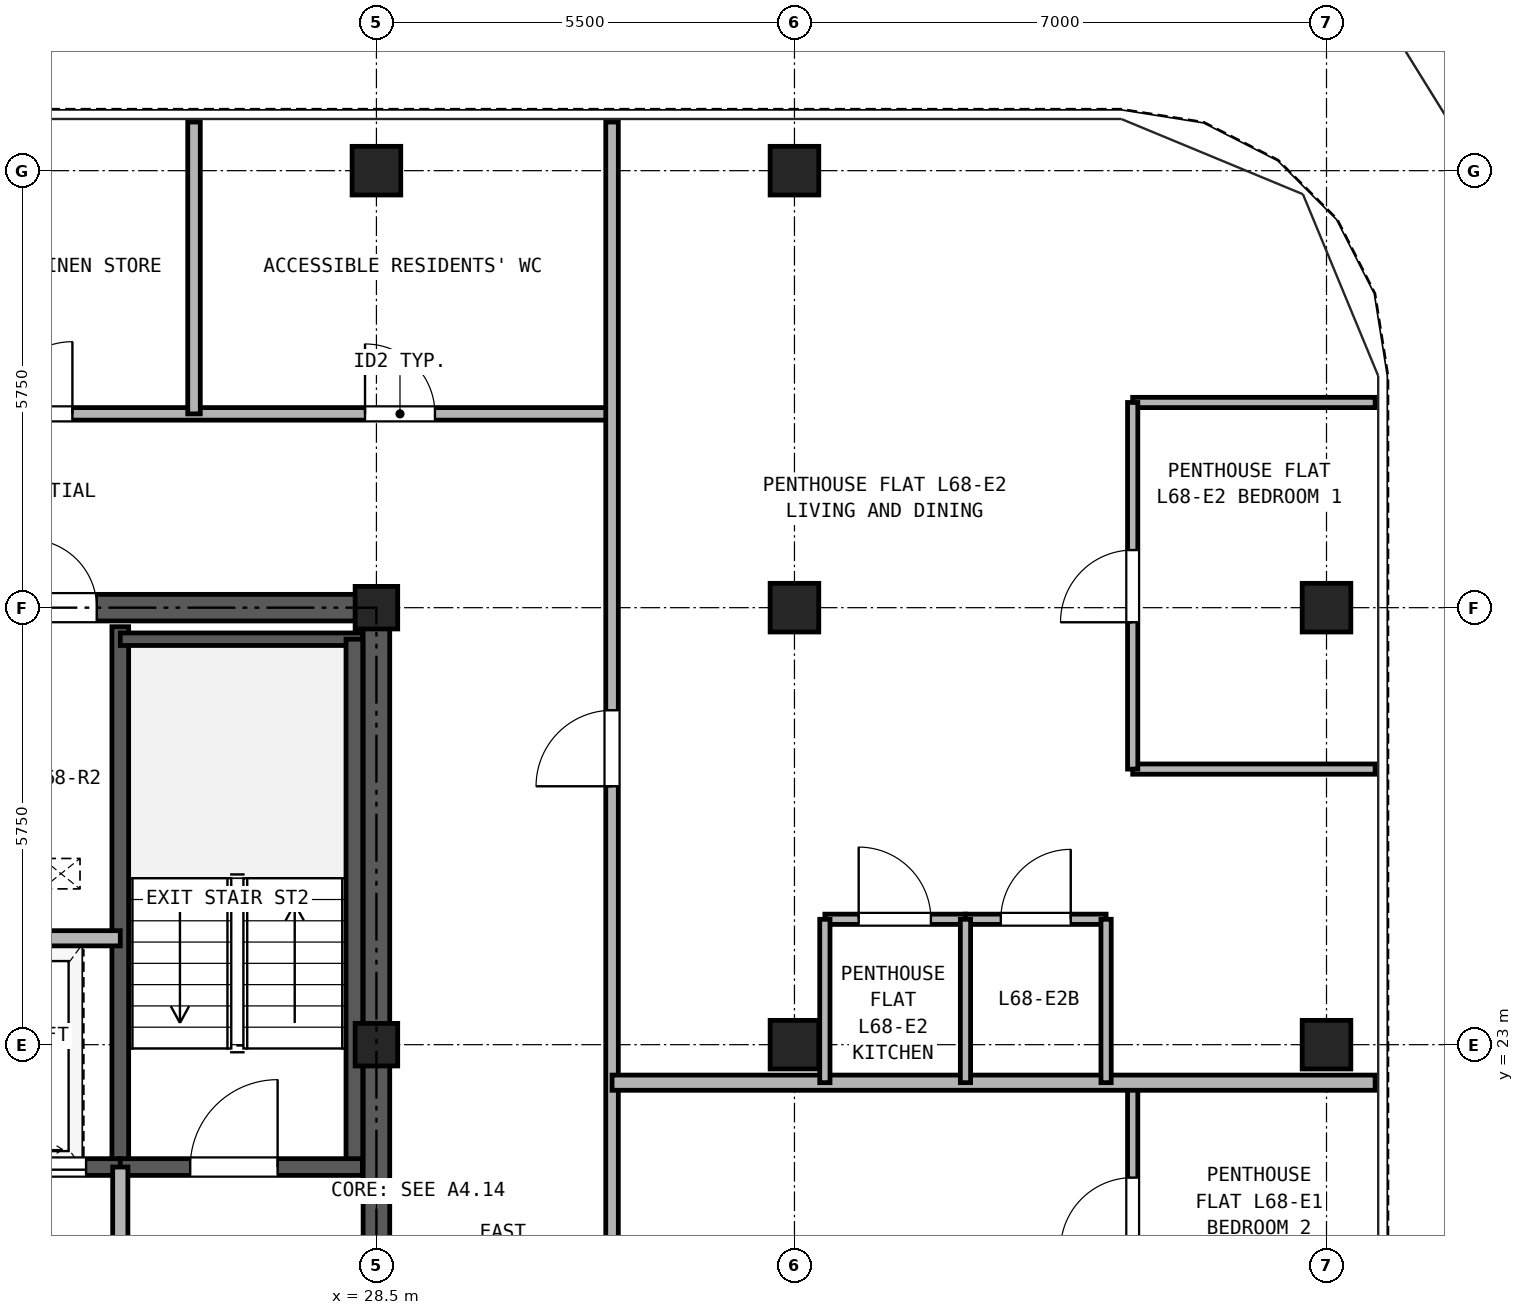
"""IFC4 building model, lengths in metres.
Left out: names, types, materials, properties, quantities, classifications, styles, units other than length and angle.
Written with IfcOpenShell. Run it as: python <this file> out.ifc"""

import sys

from ifc_helpers import new_model, si_unit, direction, frame, frame_2d, origin, origin_2d, place, context, subcontext, project, spatial, rectangle, hollow_rectangle, extrude, source, transform, mapped, element, fill, save


model = new_model("IFC4")
c1 = context("Model", 3, precision=1e-05, world=origin(), true_north=direction((0.0, 1.0)))
c2 = subcontext(c1, "Body", "Model", "MODEL_VIEW")
j1 = project(units=[si_unit("LENGTHUNIT", "METRE"), si_unit("PLANEANGLEUNIT", "RADIAN")], contexts=[c1])
p1 = place(None, origin())
s1 = spatial("IfcSite", under=j1, at=p1, CompositionType="ELEMENT")
p2 = place(p1, origin())
s2 = spatial("IfcBuilding", under=s1, at=p2, CompositionType="ELEMENT")
p3 = place(p2, frame((0.0, 0.0, 239.3)))
s3 = spatial("IfcBuildingStorey", under=s2, at=p3, CompositionType="ELEMENT", Elevation=239.3)
m1 = source(origin(), c2, "Body", "SweptSolid", [
    extrude(hollow_rectangle(XDim=0.64, YDim=0.64, WallThickness=0.035, at=origin_2d()), origin(), (0.0, 0.0, 1.0), 2.98),
])
for number, where, z_axis, x_axis in (
    (1, (28.5, 34.5, 0.0), (0.0, 0.0, 1.0), (1.0, 0.0, 0.0)),
    (2, (34.0, 34.5, 0.0), (0.0, 0.0, 1.0), (1.0, 0.0, 0.0)),
    (3, (41.0, 23.0, 0.0), (0.0, 0.0, 1.0), (1.0, 0.0, 0.0)),
    (4, (41.0, 28.75, 0.0), (0.0, 0.0, 1.0), (1.0, 0.0, 0.0)),
):
    element("IfcColumn", number, at=place(p3, frame(where, z_axis=z_axis, x_axis=x_axis)), inside=s3, PredefinedType="COLUMN", context=c2, shape_type="MappedRepresentation", body=[
        mapped(m1, transform((0.0, 0.0, 0.0), x_axis=(1.0, 0.0, 0.0), y_axis=(0.0, 1.0, 0.0), z_axis=(0.0, 0.0, 1.0), scale=1.0)),
    ])
m2 = source(origin(), c2, "Body", "SweptSolid", [
    extrude(hollow_rectangle(XDim=0.56, YDim=0.56, WallThickness=0.03, at=origin_2d()), origin(), (0.0, 0.0, 1.0), 2.98),
])
for number, where, z_axis, x_axis in (
    (5, (28.5, 23.0, 0.0), (0.0, 0.0, 1.0), (1.0, 0.0, 0.0)),
    (6, (28.5, 28.75, 0.0), (0.0, 0.0, 1.0), (1.0, 0.0, 0.0)),
):
    element("IfcColumn", number, at=place(p3, frame(where, z_axis=z_axis, x_axis=x_axis)), inside=s3, PredefinedType="COLUMN", context=c2, shape_type="MappedRepresentation", body=[
        mapped(m2, transform((0.0, 0.0, 0.0), x_axis=(1.0, 0.0, 0.0), y_axis=(0.0, 1.0, 0.0), z_axis=(0.0, 0.0, 1.0), scale=1.0)),
    ])
for number, where, z_axis, x_axis in (
    (7, (34.0, 23.0, 0.0), (0.0, 0.0, 1.0), (1.0, 0.0, 0.0)),
    (8, (34.0, 28.75, 0.0), (0.0, 0.0, 1.0), (1.0, 0.0, 0.0)),
):
    element("IfcColumn", number, at=place(p3, frame(where, z_axis=z_axis, x_axis=x_axis)), inside=s3, PredefinedType="COLUMN", context=c2, shape_type="MappedRepresentation", body=[
        mapped(m1, transform((0.0, 0.0, 0.0), x_axis=(1.0, 0.0, 0.0), y_axis=(0.0, 1.0, 0.0), z_axis=(0.0, 0.0, 1.0), scale=1.0)),
    ])
p4 = place(p3, frame((18.325, 28.75, 0.0), z_axis=(0.0, 0.0, 1.0), x_axis=(1.0, 0.0, 0.0)))
e9 = element("IfcWall", 9, at=p4, inside=s3, PredefinedType="SHEAR", context=c2, shape_type="SweptSolid", body=[
    extrude(rectangle(XDim=10.35, YDim=0.35, at=frame_2d((5.175, 0.0))), origin(), (0.0, 0.0, 1.0), 2.98),
])
p5 = place(p4, frame((4.055, 0.0, 0.0)))
e10 = element("IfcOpeningElement", 10, at=p5, cuts=e9, PredefinedType="OPENING", context=c2, shape_type="SweptSolid", body=[
    extrude(rectangle(XDim=0.9, YDim=2.05, at=frame_2d((0.45, 1.025))), frame((0.0, 0.185, 0.0), z_axis=(0.0, -1.0, 0.0), x_axis=(1.0, 0.0, 0.0)), (0.0, 0.0, 1.0), 0.37),
])
p6 = place(p4, frame((5.595, 0.0, 0.0)))
e11 = element("IfcOpeningElement", 11, at=p6, cuts=e9, PredefinedType="OPENING", context=c2, shape_type="SweptSolid", body=[
    extrude(rectangle(XDim=0.9, YDim=2.05, at=frame_2d((0.45, 1.025))), frame((0.0, 0.185, 0.0), z_axis=(0.0, -1.0, 0.0), x_axis=(1.0, 0.0, 0.0)), (0.0, 0.0, 1.0), 0.37),
])
p7 = place(p3, frame((28.5, 11.675, 0.0), z_axis=(0.0, 0.0, 1.0), x_axis=(0.0, 1.0, 0.0)))
e12 = element("IfcWall", 12, at=p7, inside=s3, PredefinedType="SHEAR", context=c2, shape_type="SweptSolid", body=[
    extrude(rectangle(XDim=16.9, YDim=0.35, at=frame_2d((8.45, 0.0))), origin(), (0.0, 0.0, 1.0), 2.98),
])
p8 = place(p7, frame((7.475, 0.0, 0.0)))
e13 = element("IfcOpeningElement", 13, at=p8, cuts=e12, PredefinedType="OPENING", context=c2, shape_type="SweptSolid", body=[
    extrude(rectangle(XDim=1.15, YDim=2.2, at=frame_2d((0.575, 1.1))), frame((0.0, 0.185, 0.0), z_axis=(0.0, -1.0, 0.0), x_axis=(1.0, 0.0, 0.0)), (0.0, 0.0, 1.0), 0.37),
])
p9 = place(p3, frame((25.13, 21.39, 0.0), z_axis=(0.0, 0.0, 1.0), x_axis=(0.0, 1.0, 0.0)))
e14 = element("IfcWall", 14, at=p9, inside=s3, PredefinedType="SOLIDWALL", context=c2, shape_type="SweptSolid", body=[
    extrude(rectangle(XDim=7.11, YDim=0.22, at=frame_2d((3.555, 0.0))), origin(), (0.0, 0.0, 1.0), 2.98),
])
p10 = place(p3, frame((25.13, 28.335, 0.0), z_axis=(0.0, 0.0, 1.0), x_axis=(1.0, 0.0, 0.0)))
e15 = element("IfcWall", 15, at=p10, inside=s3, PredefinedType="PARTITIONING", context=c2, shape_type="SweptSolid", body=[
    extrude(rectangle(XDim=3.185, YDim=0.165, at=frame_2d((1.593, 0.0))), origin(), (0.0, 0.0, 1.0), 2.98),
])
p11 = place(p3, frame((28.21, 21.39, 0.0), z_axis=(0.0, 0.0, 1.0), x_axis=(0.0, 1.0, 0.0)))
e16 = element("IfcWall", 16, at=p11, inside=s3, PredefinedType="SOLIDWALL", context=c2, shape_type="SweptSolid", body=[
    extrude(rectangle(XDim=6.945, YDim=0.22, at=frame_2d((3.473, 0.0))), origin(), (0.0, 0.0, 1.0), 2.98),
])
p12 = place(p3, frame((18.685, 21.39, 0.0), z_axis=(0.0, 0.0, 1.0), x_axis=(1.0, 0.0, 0.0)))
e17 = element("IfcWall", 17, at=p12, inside=s3, PredefinedType="SOLIDWALL", context=c2, shape_type="SweptSolid", body=[
    extrude(rectangle(XDim=6.445, YDim=0.22, at=frame_2d((3.222, 0.0))), origin(), (0.0, 0.0, 1.0), 2.98),
])
p13 = place(p12, frame((1.165, 0.0, 0.0)))
e18 = element("IfcOpeningElement", 18, at=p13, cuts=e17, PredefinedType="OPENING", context=c2, shape_type="SweptSolid", body=[
    extrude(rectangle(XDim=1.15, YDim=2.2, at=frame_2d((0.575, 1.1))), frame((0.0, 0.12, 0.0), z_axis=(0.0, -1.0, 0.0), x_axis=(1.0, 0.0, 0.0)), (0.0, 0.0, 1.0), 0.24),
])
p14 = place(p12, frame((4.895, 0.0, 0.0)))
e19 = element("IfcOpeningElement", 19, at=p14, cuts=e17, PredefinedType="OPENING", context=c2, shape_type="SweptSolid", body=[
    extrude(rectangle(XDim=1.1, YDim=2.25, at=frame_2d((0.55, 1.125))), frame((0.0, 0.12, 0.0), z_axis=(0.0, -1.0, 0.0), x_axis=(1.0, 0.0, 0.0)), (0.0, 0.0, 1.0), 0.24),
])
p15 = place(p3, frame((25.13, 21.39, 0.0), z_axis=(0.0, 0.0, 1.0), x_axis=(1.0, 0.0, 0.0)))
e20 = element("IfcWall", 20, at=p15, inside=s3, PredefinedType="SOLIDWALL", context=c2, shape_type="SweptSolid", body=[
    extrude(rectangle(XDim=3.185, YDim=0.22, at=frame_2d((1.593, 0.0))), origin(), (0.0, 0.0, 1.0), 2.98),
])
p16 = place(p15, frame((0.92, 0.0, 0.0)))
e21 = element("IfcOpeningElement", 21, at=p16, cuts=e20, PredefinedType="OPENING", context=c2, shape_type="SweptSolid", body=[
    extrude(rectangle(XDim=1.15, YDim=2.2, at=frame_2d((0.575, 1.1))), frame((0.0, 0.12, 0.0), z_axis=(0.0, -1.0, 0.0), x_axis=(1.0, 0.0, 0.0)), (0.0, 0.0, 1.0), 0.24),
])
p17 = place(p3, frame((22.11, 24.4, 0.0), z_axis=(0.0, 0.0, 1.0), x_axis=(1.0, 0.0, 0.0)))
e22 = element("IfcWall", 22, at=p17, inside=s3, PredefinedType="PARTITIONING", context=c2, shape_type="SweptSolid", body=[
    extrude(rectangle(XDim=3.02, YDim=0.2, at=frame_2d((1.51, 0.0))), origin(), (0.0, 0.0, 1.0), 2.98),
])
p18 = place(p3, frame((25.13, 18.0, 0.0), z_axis=(0.0, 0.0, 1.0), x_axis=(0.0, 1.0, 0.0)))
e23 = element("IfcWall", 23, at=p18, inside=s3, PredefinedType="PARTITIONING", context=c2, shape_type="SweptSolid", body=[
    extrude(rectangle(XDim=3.39, YDim=0.2, at=frame_2d((1.695, 0.0))), origin(), (0.0, 0.0, 1.0), 2.98),
])
p19 = place(p18, frame((1.1, 0.0, 0.0)))
e24 = element("IfcOpeningElement", 24, at=p19, cuts=e23, PredefinedType="OPENING", context=c2, shape_type="SweptSolid", body=[
    extrude(rectangle(XDim=1.15, YDim=2.2, at=frame_2d((0.575, 1.1))), frame((0.0, 0.11, 0.0), z_axis=(0.0, -1.0, 0.0), x_axis=(1.0, 0.0, 0.0)), (0.0, 0.0, 1.0), 0.22),
])
p20 = place(p3, frame((15.4, 31.3, 0.0), z_axis=(0.0, 0.0, 1.0), x_axis=(1.0, 0.0, 0.0)))
e25 = element("IfcWall", 25, at=p20, inside=s3, PredefinedType="PARTITIONING", context=c2, shape_type="SweptSolid", body=[
    extrude(rectangle(XDim=16.2, YDim=0.165, at=frame_2d((8.1, 0.0))), origin(), (0.0, 0.0, 1.0), 2.98),
])
p21 = place(p20, frame((2.8, 0.0, 0.0)))
e26 = element("IfcOpeningElement", 26, at=p21, cuts=e25, PredefinedType="OPENING", context=c2, shape_type="SweptSolid", body=[
    extrude(rectangle(XDim=0.95, YDim=2.15, at=frame_2d((0.475, 1.075))), frame((0.0, 0.093, 0.0), z_axis=(0.0, -1.0, 0.0), x_axis=(1.0, 0.0, 0.0)), (0.0, 0.0, 1.0), 0.185),
])
p22 = place(p20, frame((8.15, 0.0, 0.0)))
e27 = element("IfcOpeningElement", 27, at=p22, cuts=e25, PredefinedType="OPENING", context=c2, shape_type="SweptSolid", body=[
    extrude(rectangle(XDim=0.95, YDim=2.15, at=frame_2d((0.475, 1.075))), frame((0.0, 0.093, 0.0), z_axis=(0.0, -1.0, 0.0), x_axis=(1.0, 0.0, 0.0)), (0.0, 0.0, 1.0), 0.185),
])
p23 = place(p20, frame((12.95, 0.0, 0.0)))
e28 = element("IfcOpeningElement", 28, at=p23, cuts=e25, PredefinedType="OPENING", context=c2, shape_type="SweptSolid", body=[
    extrude(rectangle(XDim=0.92, YDim=2.1, at=frame_2d((0.46, 1.05))), frame((0.0, 0.093, 0.0), z_axis=(0.0, -1.0, 0.0), x_axis=(1.0, 0.0, 0.0)), (0.0, 0.0, 1.0), 0.185),
])
p24 = place(p3, frame((31.6, 10.7, 0.0), z_axis=(0.0, 0.0, 1.0), x_axis=(0.0, 1.0, 0.0)))
e29 = element("IfcWall", 29, at=p24, inside=s3, PredefinedType="PARTITIONING", context=c2, shape_type="SweptSolid", body=[
    extrude(rectangle(XDim=24.44, YDim=0.165, at=frame_2d((12.22, 0.0))), origin(), (0.0, 0.0, 1.0), 2.98),
])
p25 = place(p24, frame((5.4, 0.0, 0.0)))
e30 = element("IfcOpeningElement", 30, at=p25, cuts=e29, PredefinedType="OPENING", context=c2, shape_type="SweptSolid", body=[
    extrude(rectangle(XDim=1.0, YDim=2.15, at=frame_2d((0.5, 1.075))), frame((0.0, 0.093, 0.0), z_axis=(0.0, -1.0, 0.0), x_axis=(1.0, 0.0, 0.0)), (0.0, 0.0, 1.0), 0.185),
])
p26 = place(p24, frame((15.7, 0.0, 0.0)))
e31 = element("IfcOpeningElement", 31, at=p26, cuts=e29, PredefinedType="OPENING", context=c2, shape_type="SweptSolid", body=[
    extrude(rectangle(XDim=1.0, YDim=2.15, at=frame_2d((0.5, 1.075))), frame((0.0, 0.093, 0.0), z_axis=(0.0, -1.0, 0.0), x_axis=(1.0, 0.0, 0.0)), (0.0, 0.0, 1.0), 0.185),
])
p27 = place(p3, frame((38.45, 19.062, 0.0), z_axis=(0.0, 0.0, 1.0), x_axis=(0.0, 1.0, 0.0)))
e32 = element("IfcWall", 32, at=p27, inside=s3, PredefinedType="PARTITIONING", context=c2, shape_type="SweptSolid", body=[
    extrude(rectangle(XDim=3.438, YDim=0.135, at=frame_2d((1.719, 0.0))), origin(), (0.0, 0.0, 1.0), 2.98),
])
p28 = place(p27, frame((1.239, 0.0, 0.0)))
e33 = element("IfcOpeningElement", 33, at=p28, cuts=e32, PredefinedType="OPENING", context=c2, shape_type="SweptSolid", body=[
    extrude(rectangle(XDim=0.95, YDim=2.15, at=frame_2d((0.475, 1.075))), frame((0.0, 0.077, 0.0), z_axis=(0.0, -1.0, 0.0), x_axis=(1.0, 0.0, 0.0)), (0.0, 0.0, 1.0), 0.155),
])
p29 = place(p3, frame((31.6, 22.5, 0.0), z_axis=(0.0, 0.0, 1.0), x_axis=(1.0, 0.0, 0.0)))
e34 = element("IfcWall", 34, at=p29, inside=s3, PredefinedType="PARTITIONING", context=c2, shape_type="SweptSolid", body=[
    extrude(rectangle(XDim=10.04, YDim=0.2, at=frame_2d((5.02, 0.0))), origin(), (0.0, 0.0, 1.0), 2.98),
])
p30 = place(p3, frame((34.4, 24.65, 0.0), z_axis=(0.0, 0.0, 1.0), x_axis=(1.0, 0.0, 0.0)))
e35 = element("IfcWall", 35, at=p30, inside=s3, PredefinedType="PARTITIONING", context=c2, shape_type="SweptSolid", body=[
    extrude(rectangle(XDim=1.85, YDim=0.135, at=frame_2d((0.925, 0.0))), origin(), (0.0, 0.0, 1.0), 2.98),
])
p31 = place(p30, frame((0.445, 0.0, 0.0)))
e36 = element("IfcOpeningElement", 36, at=p31, cuts=e35, PredefinedType="OPENING", context=c2, shape_type="SweptSolid", body=[
    extrude(rectangle(XDim=0.95, YDim=2.15, at=frame_2d((0.475, 1.075))), frame((0.0, 0.077, 0.0), z_axis=(0.0, -1.0, 0.0), x_axis=(1.0, 0.0, 0.0)), (0.0, 0.0, 1.0), 0.155),
])
p32 = place(p3, frame((36.25, 24.65, 0.0), z_axis=(0.0, 0.0, 1.0), x_axis=(1.0, 0.0, 0.0)))
e37 = element("IfcWall", 37, at=p32, inside=s3, PredefinedType="PARTITIONING", context=c2, shape_type="SweptSolid", body=[
    extrude(rectangle(XDim=1.85, YDim=0.135, at=frame_2d((0.925, 0.0))), origin(), (0.0, 0.0, 1.0), 2.98),
])
p33 = place(p32, frame((0.465, 0.0, 0.0)))
e38 = element("IfcOpeningElement", 38, at=p33, cuts=e37, PredefinedType="OPENING", context=c2, shape_type="SweptSolid", body=[
    extrude(rectangle(XDim=0.92, YDim=2.1, at=frame_2d((0.46, 1.05))), frame((0.0, 0.077, 0.0), z_axis=(0.0, -1.0, 0.0), x_axis=(1.0, 0.0, 0.0)), (0.0, 0.0, 1.0), 0.155),
])
for number, where, z_axis, x_axis in (
    (39, (34.4, 22.5, 0.0), (0.0, 0.0, 1.0), (0.0, 1.0, 0.0)),
    (40, (36.25, 22.5, 0.0), (0.0, 0.0, 1.0), (0.0, 1.0, 0.0)),
    (41, (38.1, 22.5, 0.0), (0.0, 0.0, 1.0), (0.0, 1.0, 0.0)),
):
    element("IfcWall", number, at=place(p3, frame(where, z_axis=z_axis, x_axis=x_axis)), inside=s3, PredefinedType="PARTITIONING", context=c2, shape_type="SweptSolid", body=[
        extrude(rectangle(XDim=2.15, YDim=0.135, at=frame_2d((1.075, 0.0))), origin(), (0.0, 0.0, 1.0), 2.98),
    ])
for number, where, z_axis, x_axis in (
    (42, (38.45, 26.626, 0.0), (0.0, 0.0, 1.0), (1.0, 0.0, 0.0)),
    (43, (38.45, 31.45, 0.0), (0.0, 0.0, 1.0), (1.0, 0.0, 0.0)),
):
    element("IfcWall", number, at=place(p3, frame(where, z_axis=z_axis, x_axis=x_axis)), inside=s3, PredefinedType="PARTITIONING", context=c2, shape_type="SweptSolid", body=[
        extrude(rectangle(XDim=3.19, YDim=0.135, at=frame_2d((1.595, 0.0))), origin(), (0.0, 0.0, 1.0), 2.98),
    ])
p34 = place(p3, frame((38.45, 26.626, 0.0), z_axis=(0.0, 0.0, 1.0), x_axis=(0.0, 1.0, 0.0)))
e44 = element("IfcWall", 44, at=p34, inside=s3, PredefinedType="PARTITIONING", context=c2, shape_type="SweptSolid", body=[
    extrude(rectangle(XDim=4.824, YDim=0.135, at=frame_2d((2.412, 0.0))), origin(), (0.0, 0.0, 1.0), 2.98),
])
p35 = place(p34, frame((1.932, 0.0, 0.0)))
e45 = element("IfcOpeningElement", 45, at=p35, cuts=e44, PredefinedType="OPENING", context=c2, shape_type="SweptSolid", body=[
    extrude(rectangle(XDim=0.95, YDim=2.15, at=frame_2d((0.475, 1.075))), frame((0.0, 0.077, 0.0), z_axis=(0.0, -1.0, 0.0), x_axis=(1.0, 0.0, 0.0)), (0.0, 0.0, 1.0), 0.155),
])
p36 = place(p3, frame((26.1, 31.3, 0.0), z_axis=(0.0, 0.0, 1.0), x_axis=(0.0, 1.0, 0.0)))
e46 = element("IfcWall", 46, at=p36, inside=s3, PredefinedType="PARTITIONING", context=c2, shape_type="SweptSolid", body=[
    extrude(rectangle(XDim=3.84, YDim=0.165, at=frame_2d((1.92, 0.0))), origin(), (0.0, 0.0, 1.0), 2.98),
])
p37 = place(p16, frame((1.15, 0.0, 0.0), z_axis=(0.0, 0.0, 1.0), x_axis=(-1.0, 0.0, 0.0)))
e47 = element("IfcDoor", 47, at=p37, inside=s3, OperationType="SINGLE_SWING_RIGHT", PredefinedType="DOOR", context=c2, shape_type="SweptSolid", body=[
    extrude(rectangle(XDim=1.15, YDim=2.2, at=frame_2d((0.575, 1.1))), frame((0.0, 0.025, 0.0), z_axis=(0.0, -1.0, 0.0), x_axis=(1.0, 0.0, 0.0)), (0.0, 0.0, 1.0), 0.05),
])
fill(e21, e47)
p38 = place(p14, frame((1.1, 0.0, 0.0), z_axis=(0.0, 0.0, 1.0), x_axis=(-1.0, 0.0, 0.0)))
e48 = element("IfcDoor", 48, at=p38, inside=s3, OperationType="DOUBLE_DOOR_SLIDING", PredefinedType="DOOR", context=c2, shape_type="SweptSolid", body=[
    extrude(rectangle(XDim=1.1, YDim=2.25, at=frame_2d((0.55, 1.125))), frame((0.0, 0.025, 0.0), z_axis=(0.0, -1.0, 0.0), x_axis=(1.0, 0.0, 0.0)), (0.0, 0.0, 1.0), 0.05),
])
fill(e19, e48)
p39 = place(p6, origin())
e49 = element("IfcDoor", 49, at=p39, inside=s3, OperationType="SINGLE_SWING_LEFT", PredefinedType="DOOR", context=c2, shape_type="SweptSolid", body=[
    extrude(rectangle(XDim=0.9, YDim=2.05, at=frame_2d((0.45, 1.025))), frame((0.0, 0.025, 0.0), z_axis=(0.0, -1.0, 0.0), x_axis=(1.0, 0.0, 0.0)), (0.0, 0.0, 1.0), 0.05),
])
fill(e11, e49)
p40 = place(p28, frame((0.95, 0.0, 0.0), z_axis=(0.0, 0.0, 1.0), x_axis=(-1.0, 0.0, 0.0)))
e50 = element("IfcDoor", 50, at=p40, inside=s3, OperationType="SINGLE_SWING_LEFT", PredefinedType="DOOR", context=c2, shape_type="SweptSolid", body=[
    extrude(rectangle(XDim=0.95, YDim=2.15, at=frame_2d((0.475, 1.075))), frame((0.0, 0.025, 0.0), z_axis=(0.0, -1.0, 0.0), x_axis=(1.0, 0.0, 0.0)), (0.0, 0.0, 1.0), 0.05),
])
fill(e33, e50)
p41 = place(p31, origin())
e51 = element("IfcDoor", 51, at=p41, inside=s3, OperationType="SINGLE_SWING_LEFT", PredefinedType="DOOR", context=c2, shape_type="SweptSolid", body=[
    extrude(rectangle(XDim=0.95, YDim=2.15, at=frame_2d((0.475, 1.075))), frame((0.0, 0.025, 0.0), z_axis=(0.0, -1.0, 0.0), x_axis=(1.0, 0.0, 0.0)), (0.0, 0.0, 1.0), 0.05),
])
fill(e36, e51)
p42 = place(p33, origin())
e52 = element("IfcDoor", 52, at=p42, inside=s3, OperationType="SINGLE_SWING_RIGHT", PredefinedType="DOOR", context=c2, shape_type="SweptSolid", body=[
    extrude(rectangle(XDim=0.92, YDim=2.1, at=frame_2d((0.46, 1.05))), frame((0.0, 0.025, 0.0), z_axis=(0.0, -1.0, 0.0), x_axis=(1.0, 0.0, 0.0)), (0.0, 0.0, 1.0), 0.05),
])
fill(e38, e52)
p43 = place(p35, frame((0.95, 0.0, 0.0), z_axis=(0.0, 0.0, 1.0), x_axis=(-1.0, 0.0, 0.0)))
e53 = element("IfcDoor", 53, at=p43, inside=s3, OperationType="SINGLE_SWING_LEFT", PredefinedType="DOOR", context=c2, shape_type="SweptSolid", body=[
    extrude(rectangle(XDim=0.95, YDim=2.15, at=frame_2d((0.475, 1.075))), frame((0.0, 0.025, 0.0), z_axis=(0.0, -1.0, 0.0), x_axis=(1.0, 0.0, 0.0)), (0.0, 0.0, 1.0), 0.05),
])
fill(e45, e53)
p44 = place(p26, frame((1.0, 0.0, 0.0), z_axis=(0.0, 0.0, 1.0), x_axis=(-1.0, 0.0, 0.0)))
e54 = element("IfcDoor", 54, at=p44, inside=s3, OperationType="SINGLE_SWING_LEFT", PredefinedType="DOOR", context=c2, shape_type="SweptSolid", body=[
    extrude(rectangle(XDim=1.0, YDim=2.15, at=frame_2d((0.5, 1.075))), frame((0.0, 0.025, 0.0), z_axis=(0.0, -1.0, 0.0), x_axis=(1.0, 0.0, 0.0)), (0.0, 0.0, 1.0), 0.05),
])
fill(e31, e54)
p45 = place(p22, origin())
e55 = element("IfcDoor", 55, at=p45, inside=s3, OperationType="SINGLE_SWING_RIGHT", PredefinedType="DOOR", context=c2, shape_type="SweptSolid", body=[
    extrude(rectangle(XDim=0.95, YDim=2.15, at=frame_2d((0.475, 1.075))), frame((0.0, 0.025, 0.0), z_axis=(0.0, -1.0, 0.0), x_axis=(1.0, 0.0, 0.0)), (0.0, 0.0, 1.0), 0.05),
])
fill(e27, e55)
p46 = place(p23, origin())
e56 = element("IfcDoor", 56, at=p46, inside=s3, OperationType="SINGLE_SWING_LEFT", PredefinedType="DOOR", context=c2, shape_type="SweptSolid", body=[
    extrude(rectangle(XDim=0.92, YDim=2.1, at=frame_2d((0.46, 1.05))), frame((0.0, 0.025, 0.0), z_axis=(0.0, -1.0, 0.0), x_axis=(1.0, 0.0, 0.0)), (0.0, 0.0, 1.0), 0.05),
])
fill(e28, e56)
save(model, sys.argv[1])
